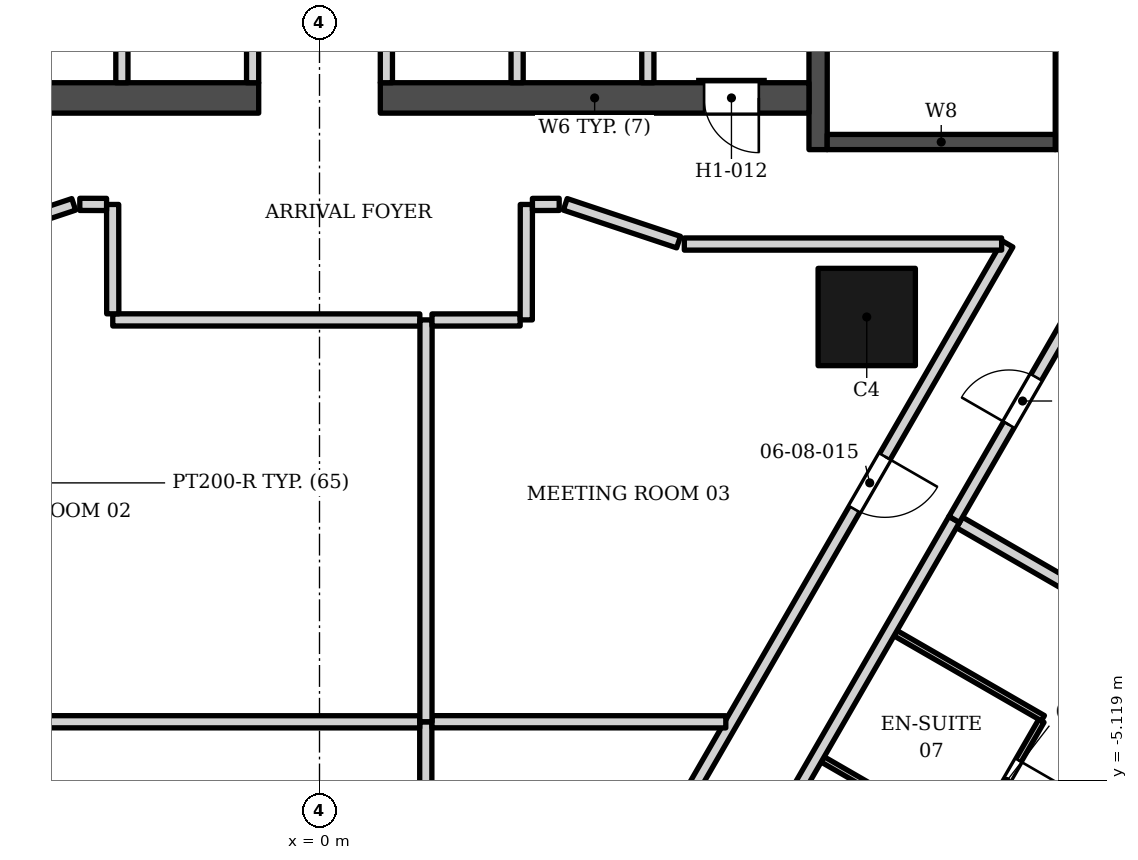
"""IFC4 building model, lengths in metres.
Left out: names, types, materials, properties, quantities, classifications, styles, units other than length and angle.
Written with IfcOpenShell. Run it as: python <this file> out.ifc"""

import sys

from ifc_helpers import new_model, si_unit, direction, frame, frame_2d, origin, origin_2d, place, context, subcontext, project, spatial, rectangle, extrude, element, fill, save


model = new_model("IFC4")
c1 = context("Model", 3, precision=1e-05, world=origin(), true_north=direction((0.0, 1.0)))
c2 = subcontext(c1, "Body", "Model", "MODEL_VIEW")
j1 = project(units=[si_unit("LENGTHUNIT", "METRE"), si_unit("PLANEANGLEUNIT", "RADIAN")], contexts=[c1])
p1 = place(None, origin())
s1 = spatial("IfcSite", under=j1, at=p1, CompositionType="ELEMENT")
p2 = place(p1, origin())
s2 = spatial("IfcBuilding", under=s1, at=p2, CompositionType="ELEMENT")
p3 = place(p2, frame((0.0, 0.0, 46.0)))
s3 = spatial("IfcBuildingStorey", under=s2, at=p3, CompositionType="ELEMENT", Elevation=46.0)
p4 = place(p3, frame((12.35, 5.253, 0.0), z_axis=(0.0, 0.0, 1.0), x_axis=(0.0, 1.0, 0.0)))
e1 = element("IfcWall", 1, at=p4, inside=s3, PredefinedType="SHEAR", context=c2, shape_type="SweptSolid", body=[
    extrude(rectangle(XDim=13.3, YDim=0.5, at=frame_2d((6.65, 0.0))), origin(), (0.0, 0.0, 1.0), 3.4),
])
p5 = place(p3, frame((8.2, 5.253, 0.0), z_axis=(0.0, 0.0, 1.0), x_axis=(0.0, 1.0, 0.0)))
e2 = element("IfcWall", 2, at=p5, inside=s3, PredefinedType="SHEAR", context=c2, shape_type="SweptSolid", body=[
    extrude(rectangle(XDim=13.3, YDim=0.3, at=frame_2d((6.65, 0.0))), origin(), (0.0, 0.0, 1.0), 3.4),
])
p6 = place(p5, frame((7.1, 0.0, 0.0)))
e3 = element("IfcOpeningElement", 3, at=p6, cuts=e2, PredefinedType="OPENING", context=c2, shape_type="SweptSolid", body=[
    extrude(rectangle(XDim=1.4, YDim=2.1, at=frame_2d((0.7, 1.05))), frame((0.0, 0.16, 0.0), z_axis=(0.0, -1.0, 0.0), x_axis=(1.0, 0.0, 0.0)), (0.0, 0.0, 1.0), 0.32),
])
p7 = place(p5, frame((5.05, 0.0, 0.0)))
e4 = element("IfcOpeningElement", 4, at=p7, cuts=e2, PredefinedType="OPENING", context=c2, shape_type="SweptSolid", body=[
    extrude(rectangle(XDim=1.4, YDim=2.1, at=frame_2d((0.7, 1.05))), frame((0.0, 0.16, 0.0), z_axis=(0.0, -1.0, 0.0), x_axis=(1.0, 0.0, 0.0)), (0.0, 0.0, 1.0), 0.32),
])
p8 = place(p3, frame((8.35, 5.378, 0.0), z_axis=(0.0, 0.0, 1.0), x_axis=(1.0, 0.0, 0.0)))
e5 = element("IfcWall", 5, at=p8, inside=s3, PredefinedType="SHEAR", context=c2, shape_type="SweptSolid", body=[
    extrude(rectangle(XDim=3.75, YDim=0.25, at=frame_2d((1.875, 0.0))), origin(), (0.0, 0.0, 1.0), 3.4),
])
p9 = place(p3, frame((-8.05, 6.103, 0.0), z_axis=(0.0, 0.0, 1.0), x_axis=(1.0, 0.0, 0.0)))
e6 = element("IfcWall", 6, at=p9, inside=s3, PredefinedType="SHEAR", context=c2, shape_type="SweptSolid", body=[
    extrude(rectangle(XDim=7.05, YDim=0.5, at=frame_2d((3.525, 0.0))), origin(), (0.0, 0.0, 1.0), 3.4),
])
p10 = place(p9, frame((0.825, 0.0, 0.0)))
e7 = element("IfcOpeningElement", 7, at=p10, cuts=e6, PredefinedType="OPENING", context=c2, shape_type="SweptSolid", body=[
    extrude(rectangle(XDim=0.9, YDim=2.1, at=frame_2d((0.45, 1.05))), frame((0.0, 0.26, 0.0), z_axis=(0.0, -1.0, 0.0), x_axis=(1.0, 0.0, 0.0)), (0.0, 0.0, 1.0), 0.52),
])
p11 = place(p3, frame((1.0, 6.103, 0.0), z_axis=(0.0, 0.0, 1.0), x_axis=(1.0, 0.0, 0.0)))
e8 = element("IfcWall", 8, at=p11, inside=s3, PredefinedType="SHEAR", context=c2, shape_type="SweptSolid", body=[
    extrude(rectangle(XDim=7.05, YDim=0.5, at=frame_2d((3.525, 0.0))), origin(), (0.0, 0.0, 1.0), 3.4),
])
p12 = place(p11, frame((5.325, 0.0, 0.0)))
e9 = element("IfcOpeningElement", 9, at=p12, cuts=e8, PredefinedType="OPENING", context=c2, shape_type="SweptSolid", body=[
    extrude(rectangle(XDim=0.9, YDim=2.1, at=frame_2d((0.45, 1.05))), frame((0.0, 0.26, 0.0), z_axis=(0.0, -1.0, 0.0), x_axis=(1.0, 0.0, 0.0)), (0.0, 0.0, 1.0), 0.52),
])
p13 = place(p3, frame((9.0, 2.5, 0.0), z_axis=(0.0, 0.0, 1.0), x_axis=(1.0, 0.0, 0.0)))
e10 = element("IfcColumn", 10, at=p13, inside=s3, PredefinedType="COLUMN", context=c2, shape_type="SweptSolid", body=[
    extrude(rectangle(XDim=1.6, YDim=1.6, at=origin_2d()), origin(), (0.0, 0.0, 1.0), 3.4),
])
for number, where, z_axis, x_axis in (
    (11, (-3.25, 6.353, 0.0), (0.0, 0.0, 1.0), (0.0, 1.0, 0.0)),
    (12, (-1.1, 6.353, 0.0), (0.0, 0.0, 1.0), (0.0, 1.0, 0.0)),
    (13, (1.1, 6.353, 0.0), (0.0, 0.0, 1.0), (0.0, 1.0, 0.0)),
    (14, (3.25, 6.353, 0.0), (0.0, 0.0, 1.0), (0.0, 1.0, 0.0)),
    (15, (5.4, 6.353, 0.0), (0.0, 0.0, 1.0), (0.0, 1.0, 0.0)),
):
    element("IfcWall", number, at=place(p3, frame(where, z_axis=z_axis, x_axis=x_axis)), inside=s3, PredefinedType="SOLIDWALL", context=c2, shape_type="SweptSolid", body=[
        extrude(rectangle(XDim=2.5, YDim=0.2, at=frame_2d((1.25, 0.0))), origin(), (0.0, 0.0, 1.0), 3.23),
    ])
p14 = place(p3, frame((1.75, -12.87, 0.0), z_axis=(0.0, 0.0, 1.0), x_axis=(0.499999309361, 0.866025802525, 0.0)))
e16 = element("IfcWall", 16, at=p14, inside=s3, PredefinedType="PARTITIONING", context=c2, shape_type="SweptSolid", body=[
    extrude(rectangle(XDim=19.134, YDim=0.2, at=frame_2d((9.567, 0.0))), origin(), (0.0, 0.0, 1.0), 2.302),
])
p15 = place(p14, frame((14.098, 0.0, 0.0)))
e17 = element("IfcOpeningElement", 17, at=p15, cuts=e16, PredefinedType="OPENING", context=c2, shape_type="SweptSolid", body=[
    extrude(rectangle(XDim=1.0, YDim=2.1, at=frame_2d((0.5, 1.05))), frame((0.0, 0.11, 0.0), z_axis=(0.0, -1.0, 0.0), x_axis=(1.0, 0.0, 0.0)), (0.0, 0.0, 1.0), 0.22),
])
p16 = place(p14, frame((4.53, 0.0, 0.0)))
e18 = element("IfcOpeningElement", 18, at=p16, cuts=e16, PredefinedType="OPENING", context=c2, shape_type="SweptSolid", body=[
    extrude(rectangle(XDim=1.0, YDim=2.1, at=frame_2d((0.5, 1.05))), frame((0.0, 0.11, 0.0), z_axis=(0.0, -1.0, 0.0), x_axis=(1.0, 0.0, 0.0)), (0.0, 0.0, 1.0), 0.22),
])
p17 = place(p3, frame((1.748, -12.674, 0.0), z_axis=(0.0, 0.0, 1.0), x_axis=(0.0, 1.0, 0.0)))
e19 = element("IfcWall", 19, at=p17, inside=s3, PredefinedType="PARTITIONING", context=c2, shape_type="SweptSolid", body=[
    extrude(rectangle(XDim=8.516, YDim=0.2, at=frame_2d((4.258, 0.0))), origin(), (0.0, 0.0, 1.0), 2.302),
])
p18 = place(p3, frame((10.722, -6.13, 0.0), z_axis=(0.0, 0.0, 1.0), x_axis=(0.500617411337, 0.865668647617, 0.0)))
e20 = element("IfcWall", 20, at=p18, inside=s3, PredefinedType="PARTITIONING", context=c2, shape_type="SweptSolid", body=[
    extrude(rectangle(XDim=2.298, YDim=0.1, at=frame_2d((1.149, 0.0))), origin(), (0.0, 0.0, 1.0), 3.23),
])
p19 = place(p18, frame((0.748, 0.0, 0.0)))
e21 = element("IfcOpeningElement", 21, at=p19, cuts=e20, PredefinedType="OPENING", context=c2, shape_type="SweptSolid", body=[
    extrude(rectangle(XDim=0.8, YDim=2.1, at=frame_2d((0.4, 1.05))), frame((0.0, 0.06, 0.0), z_axis=(0.0, -1.0, 0.0), x_axis=(1.0, 0.0, 0.0)), (0.0, 0.0, 1.0), 0.12),
])
p20 = place(p3, frame((8.274, -4.775, 0.0), z_axis=(0.0, 0.0, 1.0), x_axis=(0.866035857012, -0.499981894041, 0.0)))
e22 = element("IfcWall", 22, at=p20, inside=s3, PredefinedType="PARTITIONING", context=c2, shape_type="SweptSolid", body=[
    extrude(rectangle(XDim=7.25, YDim=0.1, at=frame_2d((3.625, 0.0))), origin(), (0.0, 0.0, 1.0), 2.384),
])
p21 = place(p20, frame((4.65, 0.0, 0.0)))
e23 = element("IfcOpeningElement", 23, at=p21, cuts=e22, PredefinedType="OPENING", context=c2, shape_type="SweptSolid", body=[
    extrude(rectangle(XDim=0.9, YDim=2.1, at=frame_2d((0.45, 1.05))), frame((0.0, 0.06, 0.0), z_axis=(0.0, -1.0, 0.0), x_axis=(1.0, 0.0, 0.0)), (0.0, 0.0, 1.0), 0.12),
])
p22 = place(p3, frame((-6.783, -4.156, 0.0), z_axis=(0.0, 0.0, 1.0), x_axis=(0.500162761554, -0.865931412962, 0.0)))
e24 = element("IfcWall", 24, at=p22, inside=s3, PredefinedType="PARTITIONING", context=c2, shape_type="SweptSolid", body=[
    extrude(rectangle(XDim=13.566, YDim=0.2, at=frame_2d((6.783, 0.0))), origin(), (0.0, 0.0, 1.0), 2.302),
])
p23 = place(p22, frame((4.642, 0.0, 0.0)))
e25 = element("IfcOpeningElement", 25, at=p23, cuts=e24, PredefinedType="OPENING", context=c2, shape_type="SweptSolid", body=[
    extrude(rectangle(XDim=0.9, YDim=2.1, at=frame_2d((0.45, 1.05))), frame((0.0, 0.11, 0.0), z_axis=(0.0, -1.0, 0.0), x_axis=(1.0, 0.0, 0.0)), (0.0, 0.0, 1.0), 0.22),
])
p24 = place(p3, frame((-6.683, -4.156, 0.0), z_axis=(0.0, 0.0, 1.0), x_axis=(0.99999997896, -0.000205134212, 0.0)))
e26 = element("IfcWall", 26, at=p24, inside=s3, PredefinedType="PARTITIONING", context=c2, shape_type="SweptSolid", body=[
    extrude(rectangle(XDim=8.331, YDim=0.2, at=frame_2d((4.166, 0.0))), origin(), (0.0, 0.0, 1.0), 3.23),
])
p25 = place(p3, frame((1.85, -4.156, 0.0), z_axis=(0.0, 0.0, 1.0), x_axis=(0.999999937456, -0.000353678232, 0.0)))
e27 = element("IfcWall", 27, at=p25, inside=s3, PredefinedType="PARTITIONING", context=c2, shape_type="SweptSolid", body=[
    extrude(rectangle(XDim=4.832, YDim=0.2, at=frame_2d((2.416, 0.0))), origin(), (0.0, 0.0, 1.0), 3.23),
])
p26 = place(p3, frame((9.472, -2.699, 0.0), z_axis=(0.0, 0.0, 1.0), x_axis=(0.866288634608, -0.499543793424, 0.0)))
e28 = element("IfcWall", 28, at=p26, inside=s3, PredefinedType="PARTITIONING", context=c2, shape_type="SweptSolid", body=[
    extrude(rectangle(XDim=2.8, YDim=0.1, at=frame_2d((1.4, 0.0))), origin(), (0.0, 0.0, 1.0), 3.23),
])
p27 = place(p3, frame((-9.937, -1.698, 0.0), z_axis=(0.0, 0.0, 1.0), x_axis=(0.500001173101, -0.866024726493, 0.0)))
e29 = element("IfcWall", 29, at=p27, inside=s3, PredefinedType="PARTITIONING", context=c2, shape_type="SweptSolid", body=[
    extrude(rectangle(XDim=13.598, YDim=0.2, at=frame_2d((6.799, 0.0))), origin(), (0.0, 0.0, 1.0), 2.302),
])
p28 = place(p27, frame((0.598, 0.0, 0.0)))
e30 = element("IfcOpeningElement", 30, at=p28, cuts=e29, PredefinedType="OPENING", context=c2, shape_type="SweptSolid", body=[
    extrude(rectangle(XDim=1.1, YDim=2.1, at=frame_2d((0.55, 1.05))), frame((0.0, 0.11, 0.0), z_axis=(0.0, -1.0, 0.0), x_axis=(1.0, 0.0, 0.0)), (0.0, 0.0, 1.0), 0.22),
])
p29 = place(p27, frame((7.398, 0.0, 0.0)))
e31 = element("IfcOpeningElement", 31, at=p29, cuts=e29, PredefinedType="OPENING", context=c2, shape_type="SweptSolid", body=[
    extrude(rectangle(XDim=1.0, YDim=2.1, at=frame_2d((0.5, 1.05))), frame((0.0, 0.11, 0.0), z_axis=(0.0, -1.0, 0.0), x_axis=(1.0, 0.0, 0.0)), (0.0, 0.0, 1.0), 0.22),
])
p30 = place(p27, frame((9.798, 0.0, 0.0)))
e32 = element("IfcOpeningElement", 32, at=p30, cuts=e29, PredefinedType="OPENING", context=c2, shape_type="SweptSolid", body=[
    extrude(rectangle(XDim=1.0, YDim=2.1, at=frame_2d((0.5, 1.05))), frame((0.0, 0.11, 0.0), z_axis=(0.0, -1.0, 0.0), x_axis=(1.0, 0.0, 0.0)), (0.0, 0.0, 1.0), 0.22),
])
p31 = place(p3, frame((10.525, -0.878, 0.0), z_axis=(0.0, 0.0, 1.0), x_axis=(0.865907869998, -0.500203519255, 0.0)))
e33 = element("IfcWall", 33, at=p31, inside=s3, PredefinedType="PARTITIONING", context=c2, shape_type="SweptSolid", body=[
    extrude(rectangle(XDim=7.248, YDim=0.2, at=frame_2d((3.624, 0.0))), origin(), (0.0, 0.0, 1.0), 2.384),
])
p32 = place(p3, frame((1.438, -16.419, 0.0), z_axis=(0.0, 0.0, 1.0), x_axis=(0.499996012009, 0.86602770624, 0.0)))
e34 = element("IfcWall", 34, at=p32, inside=s3, PredefinedType="PARTITIONING", context=c2, shape_type="SweptSolid", body=[
    extrude(rectangle(XDim=18.0, YDim=0.2, at=frame_2d((9.0, 0.0))), origin(), (0.0, 0.0, 1.0), 2.302),
])
p33 = place(p32, frame((4.0, 0.0, 0.0)))
e35 = element("IfcOpeningElement", 35, at=p33, cuts=e34, PredefinedType="OPENING", context=c2, shape_type="SweptSolid", body=[
    extrude(rectangle(XDim=1.0, YDim=2.1, at=frame_2d((0.5, 1.05))), frame((0.0, 0.11, 0.0), z_axis=(0.0, -1.0, 0.0), x_axis=(1.0, 0.0, 0.0)), (0.0, 0.0, 1.0), 0.22),
])
p34 = place(p32, frame((9.8, 0.0, 0.0)))
e36 = element("IfcOpeningElement", 36, at=p34, cuts=e34, PredefinedType="OPENING", context=c2, shape_type="SweptSolid", body=[
    extrude(rectangle(XDim=1.1, YDim=2.1, at=frame_2d((0.55, 1.05))), frame((0.0, 0.11, 0.0), z_axis=(0.0, -1.0, 0.0), x_axis=(1.0, 0.0, 0.0)), (0.0, 0.0, 1.0), 0.22),
])
p35 = place(p3, frame((-3.4, 2.452, 0.0), z_axis=(0.0, 0.0, 1.0), x_axis=(0.99999994274, -0.000338409456, 0.0)))
e37 = element("IfcWall", 37, at=p35, inside=s3, PredefinedType="PARTITIONING", context=c2, shape_type="SweptSolid", body=[
    extrude(rectangle(XDim=5.05, YDim=0.2, at=frame_2d((2.525, 0.0))), origin(), (0.0, 0.0, 1.0), 3.23),
])
p36 = place(p3, frame((1.75, -4.156, 0.0), z_axis=(0.0, 0.0, 1.0), x_axis=(0.000258617496, 0.999999966558, 0.0)))
e38 = element("IfcWall", 38, at=p36, inside=s3, PredefinedType="PARTITIONING", context=c2, shape_type="SweptSolid", body=[
    extrude(rectangle(XDim=6.608, YDim=0.2, at=frame_2d((3.304, 0.0))), origin(), (0.0, 0.0, 1.0), 3.23),
])
p37 = place(p3, frame((1.85, 2.451, 0.0), z_axis=(0.0, 0.0, 1.0), x_axis=(0.999999305627, 0.00117845036, 0.0)))
e39 = element("IfcWall", 39, at=p37, inside=s3, PredefinedType="PARTITIONING", context=c2, shape_type="SweptSolid", body=[
    extrude(rectangle(XDim=1.45, YDim=0.2, at=frame_2d((0.725, 0.0))), origin(), (0.0, 0.0, 1.0), 3.23),
])
p38 = place(p3, frame((-3.402, 4.351, 0.0), z_axis=(0.0, 0.0, 1.0), x_axis=(0.001086217961, -0.999999410065, 0.0)))
e40 = element("IfcWall", 40, at=p38, inside=s3, PredefinedType="PARTITIONING", context=c2, shape_type="SweptSolid", body=[
    extrude(rectangle(XDim=1.798, YDim=0.2, at=frame_2d((0.899, 0.0))), origin(), (0.0, 0.0, 1.0), 3.23),
])
p39 = place(p3, frame((10.439, -0.828, 0.0), z_axis=(0.0, 0.0, 1.0), x_axis=(0.500013981145, 0.866017331616, 0.0)))
e41 = element("IfcWall", 41, at=p39, inside=s3, PredefinedType="PARTITIONING", context=c2, shape_type="SweptSolid", body=[
    extrude(rectangle(XDim=4.398, YDim=0.2, at=frame_2d((2.199, 0.0))), origin(), (0.0, 0.0, 1.0), 3.23),
])
p40 = place(p39, frame((1.798, 0.0, 0.0)))
e42 = element("IfcOpeningElement", 42, at=p40, cuts=e41, PredefinedType="OPENING", context=c2, shape_type="SweptSolid", body=[
    extrude(rectangle(XDim=0.9, YDim=2.1, at=frame_2d((0.45, 1.05))), frame((0.0, 0.11, 0.0), z_axis=(0.0, -1.0, 0.0), x_axis=(1.0, 0.0, 0.0)), (0.0, 0.0, 1.0), 0.22),
])
p41 = place(p3, frame((6.0, 3.7, 0.0), z_axis=(0.0, 0.0, 1.0), x_axis=(1.0, 0.0, 0.0)))
e43 = element("IfcWall", 43, at=p41, inside=s3, PredefinedType="PARTITIONING", context=c2, shape_type="SweptSolid", body=[
    extrude(rectangle(XDim=5.219, YDim=0.2, at=frame_2d((2.609, 0.0))), origin(), (0.0, 0.0, 1.0), 2.832),
])
for number, where, z_axis, x_axis in (
    (44, (4.042, 4.352, 0.0), (0.0, 0.0, 1.0), (0.949, -0.316, 0.0)),
    (45, (-5.905, 3.731, 0.0), (0.0, 0.0, 1.0), (0.949, 0.316, 0.0)),
):
    element("IfcWall", number, at=place(p3, frame(where, z_axis=z_axis, x_axis=x_axis)), inside=s3, PredefinedType="PARTITIONING", context=c2, shape_type="SweptSolid", body=[
        extrude(rectangle(XDim=1.964, YDim=0.2, at=frame_2d((0.982, 0.0))), origin(), (0.0, 0.0, 1.0), 2.384),
    ])
p42 = place(p3, frame((-3.942, 4.352, 0.0), z_axis=(0.0, 0.0, 1.0), x_axis=(0.999996159087, -0.00277160798, 0.0)))
e46 = element("IfcWall", 46, at=p42, inside=s3, PredefinedType="PARTITIONING", context=c2, shape_type="SweptSolid", body=[
    extrude(rectangle(XDim=0.44, YDim=0.2, at=frame_2d((0.22, 0.0))), origin(), (0.0, 0.0, 1.0), 3.23),
])
p43 = place(p3, frame((3.4, 2.452, 0.0), z_axis=(0.0, 0.0, 1.0), x_axis=(0.001028938362, 0.999999470643, 0.0)))
e47 = element("IfcWall", 47, at=p43, inside=s3, PredefinedType="PARTITIONING", context=c2, shape_type="SweptSolid", body=[
    extrude(rectangle(XDim=1.898, YDim=0.2, at=frame_2d((0.949, 0.0))), origin(), (0.0, 0.0, 1.0), 3.23),
])
p44 = place(p3, frame((3.502, 4.351, 0.0), z_axis=(0.0, 0.0, 1.0), x_axis=(0.999996159087, 0.00277160798, 0.0)))
e48 = element("IfcWall", 48, at=p44, inside=s3, PredefinedType="PARTITIONING", context=c2, shape_type="SweptSolid", body=[
    extrude(rectangle(XDim=0.44, YDim=0.2, at=frame_2d((0.22, 0.0))), origin(), (0.0, 0.0, 1.0), 3.23),
])
p45 = place(p12, origin())
e49 = element("IfcDoor", 49, at=p45, inside=s3, OperationType="SINGLE_SWING_RIGHT", PredefinedType="DOOR", context=c2, shape_type="SweptSolid", body=[
    extrude(rectangle(XDim=0.9, YDim=2.1, at=frame_2d((0.45, 1.05))), frame((0.0, 0.025, 0.0), z_axis=(0.0, -1.0, 0.0), x_axis=(1.0, 0.0, 0.0)), (0.0, 0.0, 1.0), 0.05),
])
fill(e9, e49)
p46 = place(p19, origin())
e50 = element("IfcDoor", 50, at=p46, inside=s3, OperationType="SINGLE_SWING_RIGHT", PredefinedType="DOOR", context=c2, shape_type="SweptSolid", body=[
    extrude(rectangle(XDim=0.8, YDim=2.1, at=frame_2d((0.4, 1.05))), frame((0.0, 0.025, 0.0), z_axis=(0.0, -1.0, 0.0), x_axis=(1.0, 0.0, 0.0)), (0.0, 0.0, 1.0), 0.05),
])
fill(e21, e50)
p47 = place(p40, origin())
e51 = element("IfcDoor", 51, at=p47, inside=s3, OperationType="SINGLE_SWING_LEFT", PredefinedType="DOOR", context=c2, shape_type="SweptSolid", body=[
    extrude(rectangle(XDim=0.9, YDim=2.1, at=frame_2d((0.45, 1.05))), frame((0.0, 0.025, 0.0), z_axis=(0.0, -1.0, 0.0), x_axis=(1.0, 0.0, 0.0)), (0.0, 0.0, 1.0), 0.05),
])
fill(e42, e51)
p48 = place(p15, origin())
e52 = element("IfcDoor", 52, at=p48, inside=s3, OperationType="SINGLE_SWING_RIGHT", PredefinedType="DOOR", context=c2, shape_type="SweptSolid", body=[
    extrude(rectangle(XDim=1.0, YDim=2.1, at=frame_2d((0.5, 1.05))), frame((0.0, 0.025, 0.0), z_axis=(0.0, -1.0, 0.0), x_axis=(1.0, 0.0, 0.0)), (0.0, 0.0, 1.0), 0.05),
])
fill(e17, e52)
save(model, sys.argv[1])
